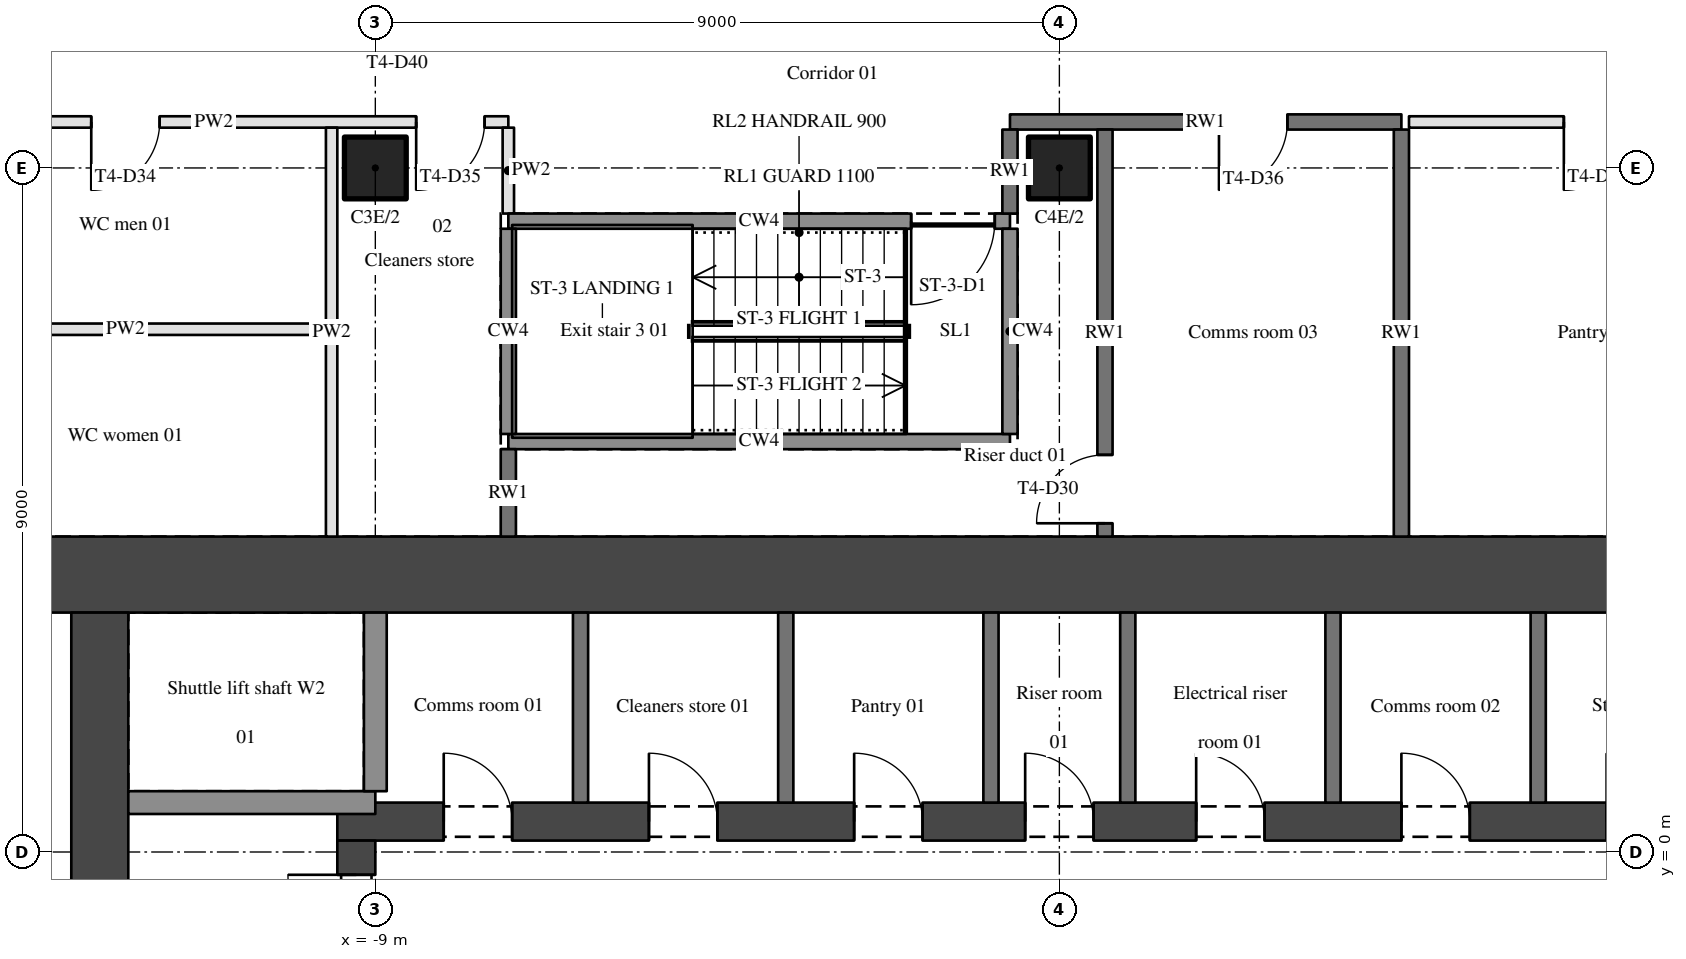
"""IFC4 building model, lengths in metres.
Left out: names, types, materials, properties, quantities, classifications, styles, units other than length and angle.
Written with IfcOpenShell. Run it as: python <this file> out.ifc"""

import sys

from ifc_helpers import new_model, si_unit, direction, frame, frame_2d, origin, origin_2d, place, context, subcontext, project, spatial, rectangle, hollow_circle, extrude, element, fill, save


model = new_model("IFC4")
c1 = context("Model", 3, precision=1e-05, world=origin(), true_north=direction((0.0, 1.0)))
c2 = subcontext(c1, "Body", "Model", "MODEL_VIEW")
j1 = project(units=[si_unit("LENGTHUNIT", "METRE"), si_unit("PLANEANGLEUNIT", "RADIAN")], contexts=[c1])
p1 = place(None, origin())
s1 = spatial("IfcSite", under=j1, at=p1, CompositionType="ELEMENT")
p2 = place(p1, origin())
s2 = spatial("IfcBuilding", under=s1, at=p2, CompositionType="ELEMENT")
p3 = place(p2, frame((0.0, 0.0, 62.1)))
s3 = spatial("IfcBuildingStorey", under=s2, at=p3, CompositionType="ELEMENT", Elevation=62.1)
for number, where, z_axis, x_axis in (
    (1, (-9.0, 9.0, 0.0), (0.0, 0.0, 1.0), (1.0, 0.0, 0.0)),
    (2, (0.0, 9.0, 0.0), (0.0, 0.0, 1.0), (1.0, 0.0, 0.0)),
):
    element("IfcColumn", number, at=place(p3, frame(where, z_axis=z_axis, x_axis=x_axis)), inside=s3, PredefinedType="COLUMN", context=c2, shape_type="SweptSolid", body=[
        extrude(hollow_circle(Radius=0.406, WallThickness=0.036, at=origin_2d()), origin(), (0.0, 0.0, 1.0), 3.9),
    ])
p4 = place(p3, frame((-15.0, 3.65, 0.0), z_axis=(0.0, 0.0, 1.0), x_axis=(1.0, 0.0, 0.0)))
e3 = element("IfcWall", 3, at=p4, inside=s3, PredefinedType="SHEAR", context=c2, shape_type="SweptSolid", body=[
    extrude(rectangle(XDim=30.0, YDim=1.0, at=frame_2d((15.0, 0.0))), origin(), (0.0, 0.0, 1.0), 3.9),
])
p5 = place(p3, frame((-12.625, -11.5, 0.0), z_axis=(0.0, 0.0, 1.0), x_axis=(0.0, 1.0, 0.0)))
e4 = element("IfcWall", 4, at=p5, inside=s3, PredefinedType="SHEAR", context=c2, shape_type="SweptSolid", body=[
    extrude(rectangle(XDim=14.65, YDim=0.75, at=frame_2d((7.325, 0.0))), origin(), (0.0, 0.0, 1.0), 3.9),
])
p6 = place(p5, frame((10.05, 0.0, 0.0)))
e5 = element("IfcOpeningElement", 5, at=p6, cuts=e4, PredefinedType="OPENING", context=c2, shape_type="SweptSolid", body=[
    extrude(rectangle(XDim=0.9, YDim=2.1, at=frame_2d((0.45, 1.05))), frame((0.0, 0.385, 0.0), z_axis=(0.0, -1.0, 0.0), x_axis=(1.0, 0.0, 0.0)), (0.0, 0.0, 1.0), 0.77),
])
p7 = place(p3, frame((-9.5, 0.4, 0.0), z_axis=(0.0, 0.0, 1.0), x_axis=(1.0, 0.0, 0.0)))
e6 = element("IfcWall", 6, at=p7, inside=s3, PredefinedType="SHEAR", context=c2, shape_type="SweptSolid", body=[
    extrude(rectangle(XDim=19.0, YDim=0.5, at=frame_2d((9.5, 0.0))), origin(), (0.0, 0.0, 1.0), 3.9),
])
p8 = place(p7, frame((1.4, 0.0, 0.0)))
e7 = element("IfcOpeningElement", 7, at=p8, cuts=e6, PredefinedType="OPENING", context=c2, shape_type="SweptSolid", body=[
    extrude(rectangle(XDim=0.9, YDim=2.1, at=frame_2d((0.45, 1.05))), frame((0.0, 0.26, 0.0), z_axis=(0.0, -1.0, 0.0), x_axis=(1.0, 0.0, 0.0)), (0.0, 0.0, 1.0), 0.52),
])
p9 = place(p7, frame((4.1, 0.0, 0.0)))
e8 = element("IfcOpeningElement", 8, at=p9, cuts=e6, PredefinedType="OPENING", context=c2, shape_type="SweptSolid", body=[
    extrude(rectangle(XDim=0.9, YDim=2.1, at=frame_2d((0.45, 1.05))), frame((0.0, 0.26, 0.0), z_axis=(0.0, -1.0, 0.0), x_axis=(1.0, 0.0, 0.0)), (0.0, 0.0, 1.0), 0.52),
])
p10 = place(p7, frame((6.8, 0.0, 0.0)))
e9 = element("IfcOpeningElement", 9, at=p10, cuts=e6, PredefinedType="OPENING", context=c2, shape_type="SweptSolid", body=[
    extrude(rectangle(XDim=0.9, YDim=2.1, at=frame_2d((0.45, 1.05))), frame((0.0, 0.26, 0.0), z_axis=(0.0, -1.0, 0.0), x_axis=(1.0, 0.0, 0.0)), (0.0, 0.0, 1.0), 0.52),
])
p11 = place(p7, frame((11.3, 0.0, 0.0)))
e10 = element("IfcOpeningElement", 10, at=p11, cuts=e6, PredefinedType="OPENING", context=c2, shape_type="SweptSolid", body=[
    extrude(rectangle(XDim=0.9, YDim=2.1, at=frame_2d((0.45, 1.05))), frame((0.0, 0.26, 0.0), z_axis=(0.0, -1.0, 0.0), x_axis=(1.0, 0.0, 0.0)), (0.0, 0.0, 1.0), 0.52),
])
p12 = place(p7, frame((14.0, 0.0, 0.0)))
e11 = element("IfcOpeningElement", 11, at=p12, cuts=e6, PredefinedType="OPENING", context=c2, shape_type="SweptSolid", body=[
    extrude(rectangle(XDim=0.9, YDim=2.1, at=frame_2d((0.45, 1.05))), frame((0.0, 0.26, 0.0), z_axis=(0.0, -1.0, 0.0), x_axis=(1.0, 0.0, 0.0)), (0.0, 0.0, 1.0), 0.52),
])
p13 = place(p7, frame((16.7, 0.0, 0.0)))
e12 = element("IfcOpeningElement", 12, at=p13, cuts=e6, PredefinedType="OPENING", context=c2, shape_type="SweptSolid", body=[
    extrude(rectangle(XDim=0.9, YDim=2.1, at=frame_2d((0.45, 1.05))), frame((0.0, 0.26, 0.0), z_axis=(0.0, -1.0, 0.0), x_axis=(1.0, 0.0, 0.0)), (0.0, 0.0, 1.0), 0.52),
])
p14 = place(p7, frame((9.05, 0.0, 0.0)))
e13 = element("IfcOpeningElement", 13, at=p14, cuts=e6, PredefinedType="OPENING", context=c2, shape_type="SweptSolid", body=[
    extrude(rectangle(XDim=0.9, YDim=2.1, at=frame_2d((0.45, 1.05))), frame((0.0, 0.26, 0.0), z_axis=(0.0, -1.0, 0.0), x_axis=(1.0, 0.0, 0.0)), (0.0, 0.0, 1.0), 0.52),
])
p15 = place(p3, frame((-9.25, -11.5, 0.0), z_axis=(0.0, 0.0, 1.0), x_axis=(0.0, 1.0, 0.0)))
e14 = element("IfcWall", 14, at=p15, inside=s3, PredefinedType="SHEAR", context=c2, shape_type="SweptSolid", body=[
    extrude(rectangle(XDim=11.65, YDim=0.5, at=frame_2d((5.825, 0.0))), origin(), (0.0, 0.0, 1.0), 3.9),
])
p16 = place(p15, frame((9.4, 0.0, 0.0)))
e15 = element("IfcOpeningElement", 15, at=p16, cuts=e14, PredefinedType="OPENING", context=c2, shape_type="SweptSolid", body=[
    extrude(rectangle(XDim=1.8, YDim=2.1, at=frame_2d((0.9, 1.05))), frame((0.0, 0.26, 0.0), z_axis=(0.0, -1.0, 0.0), x_axis=(1.0, 0.0, 0.0)), (0.0, 0.0, 1.0), 0.52),
])
p17 = place(p15, frame((5.25, 0.0, 0.0)))
e16 = element("IfcOpeningElement", 16, at=p17, cuts=e14, PredefinedType="OPENING", context=c2, shape_type="SweptSolid", body=[
    extrude(rectangle(XDim=1.1, YDim=2.1, at=frame_2d((0.55, 1.05))), frame((0.0, 0.26, 0.0), z_axis=(0.0, -1.0, 0.0), x_axis=(1.0, 0.0, 0.0)), (0.0, 0.0, 1.0), 0.52),
])
p18 = place(p3, frame((-9.0, 0.65, 0.0), z_axis=(0.0, 0.0, 1.0), x_axis=(-1.0, 0.0, 0.0)))
e17 = element("IfcWall", 17, at=p18, inside=s3, PredefinedType="SHEAR", context=c2, shape_type="SweptSolid", body=[
    extrude(rectangle(XDim=3.25, YDim=0.3, at=frame_2d((1.625, 0.0))), origin(), (0.0, 0.0, 1.0), 3.9),
])
p19 = place(p3, frame((-7.25, 5.4, 0.0), z_axis=(0.0, 0.0, 1.0), x_axis=(1.0, 0.0, 0.0)))
e18 = element("IfcWall", 18, at=p19, inside=s3, PredefinedType="SHEAR", context=c2, shape_type="SweptSolid", body=[
    extrude(rectangle(XDim=6.6, YDim=0.2, at=frame_2d((3.3, 0.0))), origin(), (0.0, 0.0, 1.0), 3.9),
])
p20 = place(p3, frame((-14.925, 6.878, 0.0), z_axis=(0.0, 0.0, 1.0), x_axis=(1.0, 0.0, 0.0)))
e19 = element("IfcWall", 19, at=p20, inside=s3, PredefinedType="PARTITIONING", context=c2, shape_type="SweptSolid", body=[
    extrude(rectangle(XDim=5.275, YDim=0.15, at=frame_2d((2.638, 0.0))), origin(), (0.0, 0.0, 1.0), 2.96),
])
p21 = place(p3, frame((-0.65, 8.3, 0.0), z_axis=(0.0, 0.0, 1.0), x_axis=(-1.0, 0.0, 0.0)))
e20 = element("IfcWall", 20, at=p21, inside=s3, PredefinedType="SHEAR", context=c2, shape_type="SweptSolid", body=[
    extrude(rectangle(XDim=6.6, YDim=0.2, at=frame_2d((3.3, 0.0))), origin(), (0.0, 0.0, 1.0), 3.9),
])
p22 = place(p21, frame((0.2, 0.0, 0.0)))
e21 = element("IfcOpeningElement", 21, at=p22, cuts=e20, PredefinedType="OPENING", context=c2, shape_type="SweptSolid", body=[
    extrude(rectangle(XDim=1.1, YDim=2.1, at=frame_2d((0.55, 1.05))), frame((0.0, 0.11, 0.0), z_axis=(0.0, -1.0, 0.0), x_axis=(1.0, 0.0, 0.0)), (0.0, 0.0, 1.0), 0.22),
])
p23 = place(p3, frame((-7.25, 9.605, 0.0), z_axis=(0.0, 0.0, 1.0), x_axis=(-1.0, 0.0, 0.0)))
e22 = element("IfcWall", 22, at=p23, inside=s3, PredefinedType="PARTITIONING", context=c2, shape_type="SweptSolid", body=[
    extrude(rectangle(XDim=7.75, YDim=0.15, at=frame_2d((3.875, 0.0))), origin(), (0.0, 0.0, 1.0), 2.96),
])
p24 = place(p23, frame((0.312, 0.0, 0.0)))
e23 = element("IfcOpeningElement", 23, at=p24, cuts=e22, PredefinedType="OPENING", context=c2, shape_type="SweptSolid", body=[
    extrude(rectangle(XDim=0.9, YDim=2.1, at=frame_2d((0.45, 1.05))), frame((0.0, 0.085, 0.0), z_axis=(0.0, -1.0, 0.0), x_axis=(1.0, 0.0, 0.0)), (0.0, 0.0, 1.0), 0.17),
])
p25 = place(p23, frame((4.587, 0.0, 0.0)))
e24 = element("IfcOpeningElement", 24, at=p25, cuts=e22, PredefinedType="OPENING", context=c2, shape_type="SweptSolid", body=[
    extrude(rectangle(XDim=0.9, YDim=2.1, at=frame_2d((0.45, 1.05))), frame((0.0, 0.085, 0.0), z_axis=(0.0, -1.0, 0.0), x_axis=(1.0, 0.0, 0.0)), (0.0, 0.0, 1.0), 0.17),
])
p26 = place(p3, frame((4.5, 9.605, 0.0), z_axis=(0.0, 0.0, 1.0), x_axis=(-1.0, 0.0, 0.0)))
e25 = element("IfcWall", 25, at=p26, inside=s3, PredefinedType="SOLIDWALL", context=c2, shape_type="SweptSolid", body=[
    extrude(rectangle(XDim=5.15, YDim=0.2, at=frame_2d((2.575, 0.0))), origin(), (0.0, 0.0, 1.0), 2.96),
])
p27 = place(p26, frame((1.5, 0.0, 0.0)))
e26 = element("IfcOpeningElement", 26, at=p27, cuts=e25, PredefinedType="OPENING", context=c2, shape_type="SweptSolid", body=[
    extrude(rectangle(XDim=0.9, YDim=2.1, at=frame_2d((0.45, 1.05))), frame((0.0, 0.11, 0.0), z_axis=(0.0, -1.0, 0.0), x_axis=(1.0, 0.0, 0.0)), (0.0, 0.0, 1.0), 0.22),
])
p28 = place(p3, frame((15.0, 9.605, 0.0), z_axis=(0.0, 0.0, 1.0), x_axis=(-1.0, 0.0, 0.0)))
e27 = element("IfcWall", 27, at=p28, inside=s3, PredefinedType="PARTITIONING", context=c2, shape_type="SweptSolid", body=[
    extrude(rectangle(XDim=10.4, YDim=0.15, at=frame_2d((5.2, 0.0))), origin(), (0.0, 0.0, 1.0), 2.96),
])
p29 = place(p28, frame((0.9, 0.0, 0.0)))
e28 = element("IfcOpeningElement", 28, at=p29, cuts=e27, PredefinedType="OPENING", context=c2, shape_type="SweptSolid", body=[
    extrude(rectangle(XDim=0.9, YDim=2.1, at=frame_2d((0.45, 1.05))), frame((0.0, 0.085, 0.0), z_axis=(0.0, -1.0, 0.0), x_axis=(1.0, 0.0, 0.0)), (0.0, 0.0, 1.0), 0.17),
])
p30 = place(p28, frame((7.462, 0.0, 0.0)))
e29 = element("IfcOpeningElement", 29, at=p30, cuts=e27, PredefinedType="OPENING", context=c2, shape_type="SweptSolid", body=[
    extrude(rectangle(XDim=0.9, YDim=2.1, at=frame_2d((0.45, 1.05))), frame((0.0, 0.085, 0.0), z_axis=(0.0, -1.0, 0.0), x_axis=(1.0, 0.0, 0.0)), (0.0, 0.0, 1.0), 0.17),
])
p31 = place(p28, frame((3.562, 0.0, 0.0)))
e30 = element("IfcOpeningElement", 30, at=p31, cuts=e27, PredefinedType="OPENING", context=c2, shape_type="SweptSolid", body=[
    extrude(rectangle(XDim=1.0, YDim=2.1, at=frame_2d((0.5, 1.05))), frame((0.0, 0.085, 0.0), z_axis=(0.0, -1.0, 0.0), x_axis=(1.0, 0.0, 0.0)), (0.0, 0.0, 1.0), 0.17),
])
p32 = place(p3, frame((-9.575, 4.15, 0.0), z_axis=(0.0, 0.0, 1.0), x_axis=(0.0, 1.0, 0.0)))
e31 = element("IfcWall", 31, at=p32, inside=s3, PredefinedType="PARTITIONING", context=c2, shape_type="SweptSolid", body=[
    extrude(rectangle(XDim=5.38, YDim=0.15, at=frame_2d((2.69, 0.0))), origin(), (0.0, 0.0, 1.0), 2.96),
])
p33 = place(p3, frame((-9.0, 0.8, 0.0), z_axis=(0.0, 0.0, 1.0), x_axis=(0.0, 1.0, 0.0)))
e32 = element("IfcWall", 32, at=p33, inside=s3, PredefinedType="SHEAR", context=c2, shape_type="SweptSolid", body=[
    extrude(rectangle(XDim=2.35, YDim=0.3, at=frame_2d((1.175, 0.0))), origin(), (0.0, 0.0, 1.0), 3.9),
])
p34 = place(p3, frame((-7.25, 4.15, 0.0), z_axis=(0.0, 0.0, 1.0), x_axis=(0.0, 1.0, 0.0)))
e33 = element("IfcWall", 33, at=p34, inside=s3, PredefinedType="SOLIDWALL", context=c2, shape_type="SweptSolid", body=[
    extrude(rectangle(XDim=1.15, YDim=0.2, at=frame_2d((0.575, 0.0))), origin(), (0.0, 0.0, 1.0), 2.96),
])
p35 = place(p3, frame((-7.25, 5.5, 0.0), z_axis=(0.0, 0.0, 1.0), x_axis=(0.0, 1.0, 0.0)))
e34 = element("IfcWall", 34, at=p35, inside=s3, PredefinedType="SHEAR", context=c2, shape_type="SweptSolid", body=[
    extrude(rectangle(XDim=2.7, YDim=0.2, at=frame_2d((1.35, 0.0))), origin(), (0.0, 0.0, 1.0), 3.9),
])
p36 = place(p3, frame((-7.25, 8.4, 0.0), z_axis=(0.0, 0.0, 1.0), x_axis=(0.0, 1.0, 0.0)))
e35 = element("IfcWall", 35, at=p36, inside=s3, PredefinedType="PARTITIONING", context=c2, shape_type="SweptSolid", body=[
    extrude(rectangle(XDim=1.13, YDim=0.15, at=frame_2d((0.565, 0.0))), origin(), (0.0, 0.0, 1.0), 2.96),
])
for number, where, z_axis, x_axis in (
    (36, (-6.3, 0.65, 0.0), (0.0, 0.0, 1.0), (0.0, 1.0, 0.0)),
    (37, (-3.6, 0.65, 0.0), (0.0, 0.0, 1.0), (0.0, 1.0, 0.0)),
    (38, (-0.9, 0.65, 0.0), (0.0, 0.0, 1.0), (0.0, 1.0, 0.0)),
):
    element("IfcWall", number, at=place(p3, frame(where, z_axis=z_axis, x_axis=x_axis)), inside=s3, PredefinedType="SOLIDWALL", context=c2, shape_type="SweptSolid", body=[
        extrude(rectangle(XDim=2.5, YDim=0.2, at=frame_2d((1.25, 0.0))), origin(), (0.0, 0.0, 1.0), 3.6),
    ])
p37 = place(p3, frame((-0.65, 5.5, 0.0), z_axis=(0.0, 0.0, 1.0), x_axis=(0.0, 1.0, 0.0)))
e39 = element("IfcWall", 39, at=p37, inside=s3, PredefinedType="SHEAR", context=c2, shape_type="SweptSolid", body=[
    extrude(rectangle(XDim=2.7, YDim=0.2, at=frame_2d((1.35, 0.0))), origin(), (0.0, 0.0, 1.0), 3.9),
])
p38 = place(p3, frame((-0.65, 8.4, 0.0), z_axis=(0.0, 0.0, 1.0), x_axis=(0.0, 1.0, 0.0)))
e40 = element("IfcWall", 40, at=p38, inside=s3, PredefinedType="SOLIDWALL", context=c2, shape_type="SweptSolid", body=[
    extrude(rectangle(XDim=1.105, YDim=0.2, at=frame_2d((0.552, 0.0))), origin(), (0.0, 0.0, 1.0), 2.96),
])
p39 = place(p3, frame((0.6, 4.15, 0.0), z_axis=(0.0, 0.0, 1.0), x_axis=(0.0, 1.0, 0.0)))
e41 = element("IfcWall", 41, at=p39, inside=s3, PredefinedType="SOLIDWALL", context=c2, shape_type="SweptSolid", body=[
    extrude(rectangle(XDim=5.355, YDim=0.2, at=frame_2d((2.677, 0.0))), origin(), (0.0, 0.0, 1.0), 2.96),
])
p40 = place(p39, frame((0.175, 0.0, 0.0)))
e42 = element("IfcOpeningElement", 42, at=p40, cuts=e41, PredefinedType="OPENING", context=c2, shape_type="SweptSolid", body=[
    extrude(rectangle(XDim=0.9, YDim=2.1, at=frame_2d((0.45, 1.05))), frame((0.0, 0.11, 0.0), z_axis=(0.0, -1.0, 0.0), x_axis=(1.0, 0.0, 0.0)), (0.0, 0.0, 1.0), 0.22),
])
for number, where, z_axis, x_axis in (
    (43, (0.9, 0.65, 0.0), (0.0, 0.0, 1.0), (0.0, 1.0, 0.0)),
    (44, (3.6, 0.65, 0.0), (0.0, 0.0, 1.0), (0.0, 1.0, 0.0)),
):
    element("IfcWall", number, at=place(p3, frame(where, z_axis=z_axis, x_axis=x_axis)), inside=s3, PredefinedType="SOLIDWALL", context=c2, shape_type="SweptSolid", body=[
        extrude(rectangle(XDim=2.5, YDim=0.2, at=frame_2d((1.25, 0.0))), origin(), (0.0, 0.0, 1.0), 3.6),
    ])
p41 = place(p3, frame((4.5, 4.15, 0.0), z_axis=(0.0, 0.0, 1.0), x_axis=(0.0, 1.0, 0.0)))
e45 = element("IfcWall", 45, at=p41, inside=s3, PredefinedType="SOLIDWALL", context=c2, shape_type="SweptSolid", body=[
    extrude(rectangle(XDim=5.355, YDim=0.2, at=frame_2d((2.677, 0.0))), origin(), (0.0, 0.0, 1.0), 2.96),
])
p42 = place(p3, frame((6.3, 0.65, 0.0), z_axis=(0.0, 0.0, 1.0), x_axis=(0.0, 1.0, 0.0)))
e46 = element("IfcWall", 46, at=p42, inside=s3, PredefinedType="SOLIDWALL", context=c2, shape_type="SweptSolid", body=[
    extrude(rectangle(XDim=2.5, YDim=0.2, at=frame_2d((1.25, 0.0))), origin(), (0.0, 0.0, 1.0), 3.6),
])
p43 = place(p16, origin())
e47 = element("IfcDoor", 47, at=p43, inside=s3, OperationType="DOUBLE_DOOR_SINGLE_SWING", PredefinedType="DOOR", context=c2, shape_type="SweptSolid", body=[
    extrude(rectangle(XDim=1.8, YDim=2.1, at=frame_2d((0.9, 1.05))), frame((0.0, 0.025, 0.0), z_axis=(0.0, -1.0, 0.0), x_axis=(1.0, 0.0, 0.0)), (0.0, 0.0, 1.0), 0.05),
])
fill(e15, e47)
p44 = place(p22, origin())
e48 = element("IfcDoor", 48, at=p44, inside=s3, OperationType="SINGLE_SWING_RIGHT", PredefinedType="DOOR", context=c2, shape_type="SweptSolid", body=[
    extrude(rectangle(XDim=1.1, YDim=2.1, at=frame_2d((0.55, 1.05))), frame((0.0, 0.025, 0.0), z_axis=(0.0, -1.0, 0.0), x_axis=(1.0, 0.0, 0.0)), (0.0, 0.0, 1.0), 0.05),
])
fill(e21, e48)
p45 = place(p8, origin())
e49 = element("IfcDoor", 49, at=p45, inside=s3, OperationType="SINGLE_SWING_LEFT", PredefinedType="DOOR", context=c2, shape_type="SweptSolid", body=[
    extrude(rectangle(XDim=0.9, YDim=2.1, at=frame_2d((0.45, 1.05))), frame((0.0, 0.025, 0.0), z_axis=(0.0, -1.0, 0.0), x_axis=(1.0, 0.0, 0.0)), (0.0, 0.0, 1.0), 0.05),
])
fill(e7, e49)
p46 = place(p9, origin())
e50 = element("IfcDoor", 50, at=p46, inside=s3, OperationType="SINGLE_SWING_LEFT", PredefinedType="DOOR", context=c2, shape_type="SweptSolid", body=[
    extrude(rectangle(XDim=0.9, YDim=2.1, at=frame_2d((0.45, 1.05))), frame((0.0, 0.025, 0.0), z_axis=(0.0, -1.0, 0.0), x_axis=(1.0, 0.0, 0.0)), (0.0, 0.0, 1.0), 0.05),
])
fill(e8, e50)
p47 = place(p10, origin())
e51 = element("IfcDoor", 51, at=p47, inside=s3, OperationType="SINGLE_SWING_LEFT", PredefinedType="DOOR", context=c2, shape_type="SweptSolid", body=[
    extrude(rectangle(XDim=0.9, YDim=2.1, at=frame_2d((0.45, 1.05))), frame((0.0, 0.025, 0.0), z_axis=(0.0, -1.0, 0.0), x_axis=(1.0, 0.0, 0.0)), (0.0, 0.0, 1.0), 0.05),
])
fill(e9, e51)
p48 = place(p11, origin())
e52 = element("IfcDoor", 52, at=p48, inside=s3, OperationType="SINGLE_SWING_LEFT", PredefinedType="DOOR", context=c2, shape_type="SweptSolid", body=[
    extrude(rectangle(XDim=0.9, YDim=2.1, at=frame_2d((0.45, 1.05))), frame((0.0, 0.025, 0.0), z_axis=(0.0, -1.0, 0.0), x_axis=(1.0, 0.0, 0.0)), (0.0, 0.0, 1.0), 0.05),
])
fill(e10, e52)
p49 = place(p12, origin())
e53 = element("IfcDoor", 53, at=p49, inside=s3, OperationType="SINGLE_SWING_LEFT", PredefinedType="DOOR", context=c2, shape_type="SweptSolid", body=[
    extrude(rectangle(XDim=0.9, YDim=2.1, at=frame_2d((0.45, 1.05))), frame((0.0, 0.025, 0.0), z_axis=(0.0, -1.0, 0.0), x_axis=(1.0, 0.0, 0.0)), (0.0, 0.0, 1.0), 0.05),
])
fill(e11, e53)
p50 = place(p14, origin())
e54 = element("IfcDoor", 54, at=p50, inside=s3, OperationType="SINGLE_SWING_LEFT", PredefinedType="DOOR", context=c2, shape_type="SweptSolid", body=[
    extrude(rectangle(XDim=0.9, YDim=2.1, at=frame_2d((0.45, 1.05))), frame((0.0, 0.025, 0.0), z_axis=(0.0, -1.0, 0.0), x_axis=(1.0, 0.0, 0.0)), (0.0, 0.0, 1.0), 0.05),
])
fill(e13, e54)
p51 = place(p40, origin())
e55 = element("IfcDoor", 55, at=p51, inside=s3, OperationType="SINGLE_SWING_LEFT", PredefinedType="DOOR", context=c2, shape_type="SweptSolid", body=[
    extrude(rectangle(XDim=0.9, YDim=2.1, at=frame_2d((0.45, 1.05))), frame((0.0, 0.025, 0.0), z_axis=(0.0, -1.0, 0.0), x_axis=(1.0, 0.0, 0.0)), (0.0, 0.0, 1.0), 0.05),
])
fill(e42, e55)
p52 = place(p27, origin())
e56 = element("IfcDoor", 56, at=p52, inside=s3, OperationType="SINGLE_SWING_RIGHT", PredefinedType="DOOR", context=c2, shape_type="SweptSolid", body=[
    extrude(rectangle(XDim=0.9, YDim=2.1, at=frame_2d((0.45, 1.05))), frame((0.0, 0.025, 0.0), z_axis=(0.0, -1.0, 0.0), x_axis=(1.0, 0.0, 0.0)), (0.0, 0.0, 1.0), 0.05),
])
fill(e26, e56)
p53 = place(p30, origin())
e57 = element("IfcDoor", 57, at=p53, inside=s3, OperationType="SINGLE_SWING_RIGHT", PredefinedType="DOOR", context=c2, shape_type="SweptSolid", body=[
    extrude(rectangle(XDim=0.9, YDim=2.1, at=frame_2d((0.45, 1.05))), frame((0.0, 0.025, 0.0), z_axis=(0.0, -1.0, 0.0), x_axis=(1.0, 0.0, 0.0)), (0.0, 0.0, 1.0), 0.05),
])
fill(e29, e57)
p54 = place(p24, origin())
e58 = element("IfcDoor", 58, at=p54, inside=s3, OperationType="SINGLE_SWING_RIGHT", PredefinedType="DOOR", context=c2, shape_type="SweptSolid", body=[
    extrude(rectangle(XDim=0.9, YDim=2.1, at=frame_2d((0.45, 1.05))), frame((0.0, 0.025, 0.0), z_axis=(0.0, -1.0, 0.0), x_axis=(1.0, 0.0, 0.0)), (0.0, 0.0, 1.0), 0.05),
])
fill(e23, e58)
p55 = place(p25, origin())
e59 = element("IfcDoor", 59, at=p55, inside=s3, OperationType="SINGLE_SWING_RIGHT", PredefinedType="DOOR", context=c2, shape_type="SweptSolid", body=[
    extrude(rectangle(XDim=0.9, YDim=2.1, at=frame_2d((0.45, 1.05))), frame((0.0, 0.025, 0.0), z_axis=(0.0, -1.0, 0.0), x_axis=(1.0, 0.0, 0.0)), (0.0, 0.0, 1.0), 0.05),
])
fill(e24, e59)
save(model, sys.argv[1])
